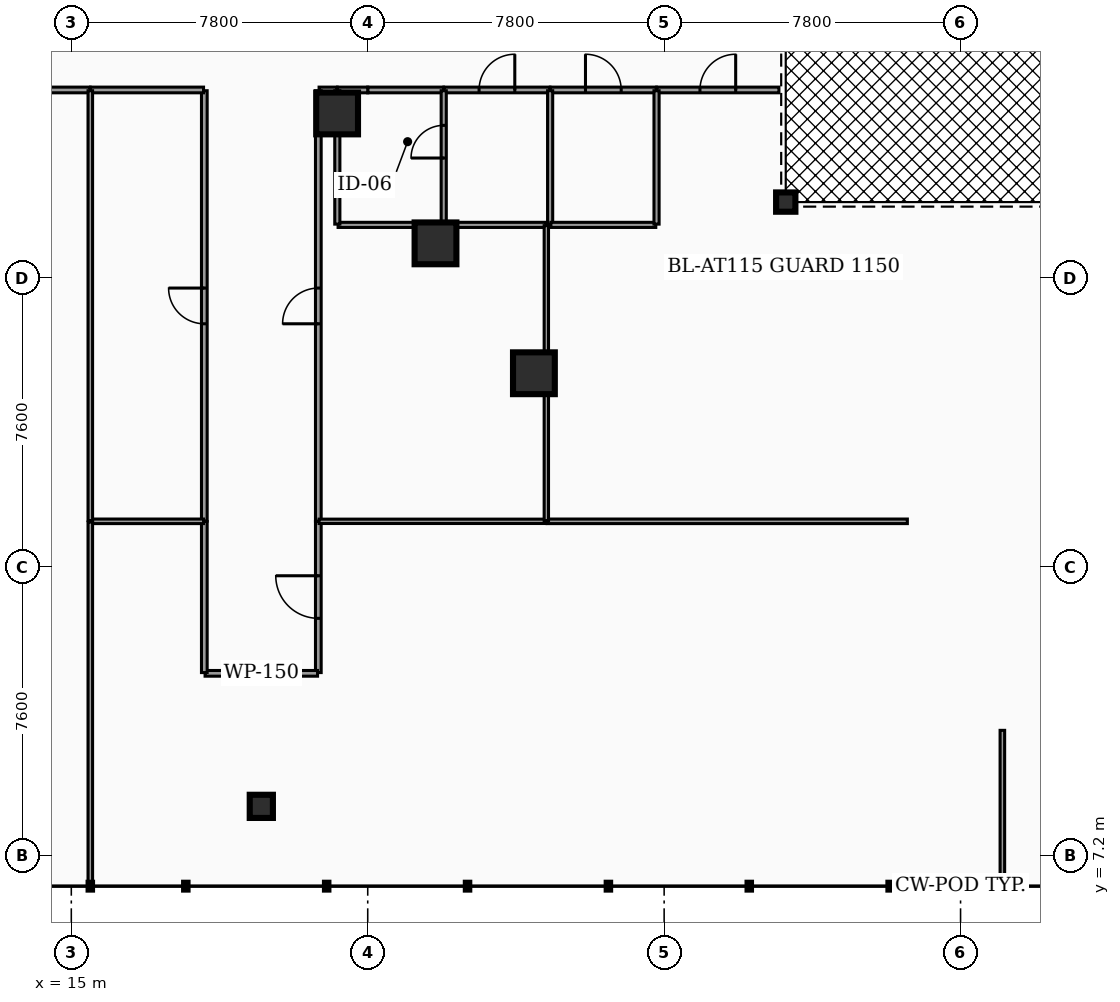
"""IFC4 building model, lengths in metres.
Left out: names, types, materials, properties, quantities, classifications, styles, units other than length and angle.
Written with IfcOpenShell. Run it as: python <this file> out.ifc"""

import sys

from ifc_helpers import new_model, si_unit, direction, frame, frame_2d, origin, origin_2d, place, context, subcontext, project, spatial, rectangle, hollow_rectangle, hollow_circle, extrude, element, fill, save


model = new_model("IFC4")
c1 = context("Model", 3, precision=1e-05, world=origin(), true_north=direction((0.0, 1.0)))
c2 = subcontext(c1, "Body", "Model", "MODEL_VIEW")
j1 = project(units=[si_unit("LENGTHUNIT", "METRE"), si_unit("PLANEANGLEUNIT", "RADIAN")], contexts=[c1])
p1 = place(None, origin())
s1 = spatial("IfcSite", under=j1, at=p1, CompositionType="ELEMENT")
p2 = place(p1, origin())
s2 = spatial("IfcBuilding", under=s1, at=p2, CompositionType="ELEMENT")
p3 = place(p2, frame((0.0, 0.0, 18.36)))
s3 = spatial("IfcBuildingStorey", under=s2, at=p3, CompositionType="ELEMENT", Elevation=18.36)
for number, where, z_axis, x_axis in (
    (1, (21.994, 26.732, 0.0), (0.0, 0.0, 1.0), (1.0, 0.0, 0.0)),
    (2, (24.583, 23.314, 0.0), (0.0, 0.0, 1.0), (1.0, 0.0, 0.0)),
    (3, (27.173, 19.896, 0.0), (0.0, 0.0, 1.0), (1.0, 0.0, 0.0)),
):
    element("IfcColumn", number, at=place(p3, frame(where, z_axis=z_axis, x_axis=x_axis)), inside=s3, PredefinedType="COLUMN", context=c2, shape_type="SweptSolid", body=[
        extrude(hollow_rectangle(XDim=1.1, YDim=1.1, WallThickness=0.055, at=origin_2d()), origin(), (0.0, 0.0, 1.0), 4.07),
    ])
p4 = place(p3, frame((33.8, 24.4, 0.0), z_axis=(0.0, 0.0, 1.0), x_axis=(1.0, 0.0, 0.0)))
e4 = element("IfcColumn", 4, at=p4, inside=s3, PredefinedType="COLUMN", context=c2, shape_type="SweptSolid", body=[
    extrude(hollow_circle(Radius=0.254, WallThickness=0.02, at=origin_2d()), origin(), (0.0, 0.0, 1.0), 4.07),
])
p5 = place(p3, frame((20.0, 8.5, 0.0), z_axis=(0.0, 0.0, 1.0), x_axis=(1.0, 0.0, 0.0)))
e5 = element("IfcColumn", 5, at=p5, inside=s3, PredefinedType="COLUMN", context=c2, shape_type="SweptSolid", body=[
    extrude(hollow_circle(Radius=0.305, WallThickness=0.025, at=origin_2d()), origin(), (0.0, 0.0, 1.0), 4.14),
])
p6 = place(p3, frame((22.8, 27.35, 0.0), z_axis=(0.0, 0.0, 1.0), x_axis=(1.0, 0.0, 0.0)))
e6 = element("IfcWall", 6, at=p6, inside=s3, PredefinedType="PARTITIONING", context=c2, shape_type="SweptSolid", body=[
    extrude(rectangle(XDim=1.995, YDim=0.15, at=frame_2d((0.998, 0.0))), origin(), (0.0, 0.0, 1.0), 3.027),
])
p7 = place(p3, frame((22.005, 27.35, 0.0), z_axis=(0.0, 0.0, 1.0), x_axis=(1.0, 0.0, 0.0)))
e7 = element("IfcWall", 7, at=p7, inside=s3, PredefinedType="PARTITIONING", context=c2, shape_type="SweptSolid", body=[
    extrude(rectangle(XDim=0.795, YDim=0.15, at=frame_2d((0.397, 0.0))), origin(), (0.0, 0.0, 1.0), 3.027),
])
p8 = place(p3, frame((24.805, 27.35, 0.0), z_axis=(0.0, 0.0, 1.0), x_axis=(1.0, 0.0, 0.0)))
e8 = element("IfcWall", 8, at=p8, inside=s3, PredefinedType="PARTITIONING", context=c2, shape_type="SweptSolid", body=[
    extrude(rectangle(XDim=2.79, YDim=0.15, at=frame_2d((1.395, 0.0))), origin(), (0.0, 0.0, 1.0), 3.027),
])
p9 = place(p8, frame((0.925, 0.0, 0.0)))
e9 = element("IfcOpeningElement", 9, at=p9, cuts=e8, PredefinedType="OPENING", context=c2, shape_type="SweptSolid", body=[
    extrude(rectangle(XDim=0.94, YDim=2.05, at=frame_2d((0.47, 1.025))), frame((0.0, 0.085, 0.0), z_axis=(0.0, -1.0, 0.0), x_axis=(1.0, 0.0, 0.0)), (0.0, 0.0, 1.0), 0.17),
])
p10 = place(p3, frame((27.605, 27.35, 0.0), z_axis=(0.0, 0.0, 1.0), x_axis=(1.0, 0.0, 0.0)))
e10 = element("IfcWall", 10, at=p10, inside=s3, PredefinedType="PARTITIONING", context=c2, shape_type="SweptSolid", body=[
    extrude(rectangle(XDim=2.79, YDim=0.15, at=frame_2d((1.395, 0.0))), origin(), (0.0, 0.0, 1.0), 3.027),
])
p11 = place(p10, frame((0.925, 0.0, 0.0)))
e11 = element("IfcOpeningElement", 11, at=p11, cuts=e10, PredefinedType="OPENING", context=c2, shape_type="SweptSolid", body=[
    extrude(rectangle(XDim=0.94, YDim=2.05, at=frame_2d((0.47, 1.025))), frame((0.0, 0.085, 0.0), z_axis=(0.0, -1.0, 0.0), x_axis=(1.0, 0.0, 0.0)), (0.0, 0.0, 1.0), 0.17),
])
p12 = place(p3, frame((21.5, 12.02, 0.0), z_axis=(0.0, 0.0, 1.0), x_axis=(0.0, 1.0, 0.0)))
e12 = element("IfcWall", 12, at=p12, inside=s3, PredefinedType="PARTITIONING", context=c2, shape_type="SweptSolid", body=[
    extrude(rectangle(XDim=3.975, YDim=0.15, at=frame_2d((1.988, 0.0))), origin(), (0.0, 0.0, 1.0), 3.027),
])
p13 = place(p12, frame((1.427, 0.0, 0.0)))
e13 = element("IfcOpeningElement", 13, at=p13, cuts=e12, PredefinedType="OPENING", context=c2, shape_type="SweptSolid", body=[
    extrude(rectangle(XDim=1.12, YDim=2.05, at=frame_2d((0.56, 1.025))), frame((0.0, 0.085, 0.0), z_axis=(0.0, -1.0, 0.0), x_axis=(1.0, 0.0, 0.0)), (0.0, 0.0, 1.0), 0.17),
])
p14 = place(p3, frame((18.52, 12.0, 0.0), z_axis=(0.0, 0.0, 1.0), x_axis=(1.0, 0.0, 0.0)))
e14 = element("IfcWall", 14, at=p14, inside=s3, PredefinedType="PARTITIONING", context=c2, shape_type="SweptSolid", body=[
    extrude(rectangle(XDim=2.96, YDim=0.15, at=frame_2d((1.48, 0.0))), origin(), (0.0, 0.0, 1.0), 3.027),
])
p15 = place(p3, frame((18.5, 12.02, 0.0), z_axis=(0.0, 0.0, 1.0), x_axis=(0.0, 1.0, 0.0)))
e15 = element("IfcWall", 15, at=p15, inside=s3, PredefinedType="PARTITIONING", context=c2, shape_type="SweptSolid", body=[
    extrude(rectangle(XDim=3.975, YDim=0.15, at=frame_2d((1.988, 0.0))), origin(), (0.0, 0.0, 1.0), 3.027),
])
p16 = place(p3, frame((21.52, 27.35, 0.0), z_axis=(0.0, 0.0, 1.0), x_axis=(1.0, 0.0, 0.0)))
e16 = element("IfcWall", 16, at=p16, inside=s3, PredefinedType="PARTITIONING", context=c2, shape_type="SweptSolid", body=[
    extrude(rectangle(XDim=0.475, YDim=0.15, at=frame_2d((0.238, 0.0))), origin(), (0.0, 0.0, 1.0), 3.027),
])
p17 = place(p3, frame((21.5, 16.005, 0.0), z_axis=(0.0, 0.0, 1.0), x_axis=(0.0, 1.0, 0.0)))
e17 = element("IfcWall", 17, at=p17, inside=s3, PredefinedType="PARTITIONING", context=c2, shape_type="SweptSolid", body=[
    extrude(rectangle(XDim=11.325, YDim=0.15, at=frame_2d((5.663, 0.0))), origin(), (0.0, 0.0, 1.0), 3.027),
])
p18 = place(p17, frame((5.192, 0.0, 0.0)))
e18 = element("IfcOpeningElement", 18, at=p18, cuts=e17, PredefinedType="OPENING", context=c2, shape_type="SweptSolid", body=[
    extrude(rectangle(XDim=0.94, YDim=2.05, at=frame_2d((0.47, 1.025))), frame((0.0, 0.085, 0.0), z_axis=(0.0, -1.0, 0.0), x_axis=(1.0, 0.0, 0.0)), (0.0, 0.0, 1.0), 0.17),
])
p19 = place(p3, frame((30.405, 27.35, 0.0), z_axis=(0.0, 0.0, 1.0), x_axis=(1.0, 0.0, 0.0)))
e19 = element("IfcWall", 19, at=p19, inside=s3, PredefinedType="PARTITIONING", context=c2, shape_type="SweptSolid", body=[
    extrude(rectangle(XDim=3.215, YDim=0.15, at=frame_2d((1.607, 0.0))), origin(), (0.0, 0.0, 1.0), 3.027),
])
p20 = place(p19, frame((1.137, 0.0, 0.0)))
e20 = element("IfcOpeningElement", 20, at=p20, cuts=e19, PredefinedType="OPENING", context=c2, shape_type="SweptSolid", body=[
    extrude(rectangle(XDim=0.94, YDim=2.05, at=frame_2d((0.47, 1.025))), frame((0.0, 0.085, 0.0), z_axis=(0.0, -1.0, 0.0), x_axis=(1.0, 0.0, 0.0)), (0.0, 0.0, 1.0), 0.17),
])
p21 = place(p3, frame((18.5, 16.005, 0.0), z_axis=(0.0, 0.0, 1.0), x_axis=(0.0, 1.0, 0.0)))
e21 = element("IfcWall", 21, at=p21, inside=s3, PredefinedType="PARTITIONING", context=c2, shape_type="SweptSolid", body=[
    extrude(rectangle(XDim=11.325, YDim=0.15, at=frame_2d((5.663, 0.0))), origin(), (0.0, 0.0, 1.0), 3.027),
])
p22 = place(p21, frame((5.192, 0.0, 0.0)))
e22 = element("IfcOpeningElement", 22, at=p22, cuts=e21, PredefinedType="OPENING", context=c2, shape_type="SweptSolid", body=[
    extrude(rectangle(XDim=0.94, YDim=2.05, at=frame_2d((0.47, 1.025))), frame((0.0, 0.085, 0.0), z_axis=(0.0, -1.0, 0.0), x_axis=(1.0, 0.0, 0.0)), (0.0, 0.0, 1.0), 0.17),
])
p23 = place(p3, frame((15.505, 27.35, 0.0), z_axis=(0.0, 0.0, 1.0), x_axis=(1.0, 0.0, 0.0)))
e23 = element("IfcWall", 23, at=p23, inside=s3, PredefinedType="PARTITIONING", context=c2, shape_type="SweptSolid", body=[
    extrude(rectangle(XDim=2.975, YDim=0.15, at=frame_2d((1.488, 0.0))), origin(), (0.0, 0.0, 1.0), 3.027),
])
p24 = place(p3, frame((11.52, 27.35, 0.0), z_axis=(0.0, 0.0, 1.0), x_axis=(1.0, 0.0, 0.0)))
e24 = element("IfcWall", 24, at=p24, inside=s3, PredefinedType="PARTITIONING", context=c2, shape_type="SweptSolid", body=[
    extrude(rectangle(XDim=3.975, YDim=0.15, at=frame_2d((1.988, 0.0))), origin(), (0.0, 0.0, 1.0), 3.027),
])
p25 = place(p24, frame((1.518, 0.0, 0.0)))
e25 = element("IfcOpeningElement", 25, at=p25, cuts=e24, PredefinedType="OPENING", context=c2, shape_type="SweptSolid", body=[
    extrude(rectangle(XDim=0.94, YDim=2.05, at=frame_2d((0.47, 1.025))), frame((0.0, 0.085, 0.0), z_axis=(0.0, -1.0, 0.0), x_axis=(1.0, 0.0, 0.0)), (0.0, 0.0, 1.0), 0.17),
])
p26 = place(p3, frame((24.8, 23.848, 0.0), z_axis=(0.0, 0.0, 1.0), x_axis=(0.0, 1.0, 0.0)))
e26 = element("IfcWall", 26, at=p26, inside=s3, PredefinedType="PARTITIONING", context=c2, shape_type="SweptSolid", body=[
    extrude(rectangle(XDim=3.482, YDim=0.135, at=frame_2d((1.741, 0.0))), origin(), (0.0, 0.0, 1.0), 3.027),
])
p27 = place(p26, frame((1.711, 0.0, 0.0)))
e27 = element("IfcOpeningElement", 27, at=p27, cuts=e26, PredefinedType="OPENING", context=c2, shape_type="SweptSolid", body=[
    extrude(rectangle(XDim=0.86, YDim=2.05, at=frame_2d((0.43, 1.025))), frame((0.0, 0.077, 0.0), z_axis=(0.0, -1.0, 0.0), x_axis=(1.0, 0.0, 0.0)), (0.0, 0.0, 1.0), 0.155),
])
p28 = place(p3, frame((22.02, 23.8, 0.0), z_axis=(0.0, 0.0, 1.0), x_axis=(1.0, 0.0, 0.0)))
e28 = element("IfcWall", 28, at=p28, inside=s3, PredefinedType="PARTITIONING", context=c2, shape_type="SweptSolid", body=[
    extrude(rectangle(XDim=2.732, YDim=0.135, at=frame_2d((1.366, 0.0))), origin(), (0.0, 0.0, 1.0), 3.027),
])
for number, where, z_axis, x_axis in (
    (29, (22.0, 23.82, 0.0), (0.0, 0.0, 1.0), (0.0, 1.0, 0.0)),
    (30, (27.6, 23.82, 0.0), (0.0, 0.0, 1.0), (0.0, 1.0, 0.0)),
):
    element("IfcWall", number, at=place(p3, frame(where, z_axis=z_axis, x_axis=x_axis)), inside=s3, PredefinedType="PARTITIONING", context=c2, shape_type="SweptSolid", body=[
        extrude(rectangle(XDim=3.51, YDim=0.135, at=frame_2d((1.755, 0.0))), origin(), (0.0, 0.0, 1.0), 3.027),
    ])
p29 = place(p3, frame((24.848, 23.8, 0.0), z_axis=(0.0, 0.0, 1.0), x_axis=(1.0, 0.0, 0.0)))
e31 = element("IfcWall", 31, at=p29, inside=s3, PredefinedType="PARTITIONING", context=c2, shape_type="SweptSolid", body=[
    extrude(rectangle(XDim=2.647, YDim=0.135, at=frame_2d((1.324, 0.0))), origin(), (0.0, 0.0, 1.0), 3.027),
])
p30 = place(p3, frame((27.62, 23.8, 0.0), z_axis=(0.0, 0.0, 1.0), x_axis=(1.0, 0.0, 0.0)))
e32 = element("IfcWall", 32, at=p30, inside=s3, PredefinedType="PARTITIONING", context=c2, shape_type="SweptSolid", body=[
    extrude(rectangle(XDim=2.76, YDim=0.135, at=frame_2d((1.38, 0.0))), origin(), (0.0, 0.0, 1.0), 3.027),
])
p31 = place(p3, frame((30.4, 23.82, 0.0), z_axis=(0.0, 0.0, 1.0), x_axis=(0.0, 1.0, 0.0)))
e33 = element("IfcWall", 33, at=p31, inside=s3, PredefinedType="PARTITIONING", context=c2, shape_type="SweptSolid", body=[
    extrude(rectangle(XDim=3.51, YDim=0.135, at=frame_2d((1.755, 0.0))), origin(), (0.0, 0.0, 1.0), 3.027),
])
p32 = place(p3, frame((21.52, 16.0, 0.0), z_axis=(0.0, 0.0, 1.0), x_axis=(1.0, 0.0, 0.0)))
e34 = element("IfcWall", 34, at=p32, inside=s3, PredefinedType="MOVABLE", context=c2, shape_type="SweptSolid", body=[
    extrude(rectangle(XDim=5.96, YDim=0.115, at=frame_2d((2.98, 0.0))), origin(), (0.0, 0.0, 1.0), 3.027),
])
p33 = place(p3, frame((27.52, 16.0, 0.0), z_axis=(0.0, 0.0, 1.0), x_axis=(1.0, 0.0, 0.0)))
e35 = element("IfcWall", 35, at=p33, inside=s3, PredefinedType="PARTITIONING", context=c2, shape_type="SweptSolid", body=[
    extrude(rectangle(XDim=9.48, YDim=0.12, at=frame_2d((4.74, 0.0))), origin(), (0.0, 0.0, 1.0), 3.027),
])
p34 = place(p3, frame((39.5, 6.415, 0.0), z_axis=(0.0, 0.0, 1.0), x_axis=(0.0, 1.0, 0.0)))
e36 = element("IfcWall", 36, at=p34, inside=s3, PredefinedType="PARTITIONING", context=c2, shape_type="SweptSolid", body=[
    extrude(rectangle(XDim=4.085, YDim=0.12, at=frame_2d((2.042, 0.0))), origin(), (0.0, 0.0, 1.0), 3.027),
])
p35 = place(p3, frame((15.52, 16.0, 0.0), z_axis=(0.0, 0.0, 1.0), x_axis=(1.0, 0.0, 0.0)))
e37 = element("IfcWall", 37, at=p35, inside=s3, PredefinedType="PARTITIONING", context=c2, shape_type="SweptSolid", body=[
    extrude(rectangle(XDim=2.96, YDim=0.12, at=frame_2d((1.48, 0.0))), origin(), (0.0, 0.0, 1.0), 3.027),
])
p36 = place(p3, frame((15.5, 6.415, 0.0), z_axis=(0.0, 0.0, 1.0), x_axis=(0.0, 1.0, 0.0)))
e38 = element("IfcWall", 38, at=p36, inside=s3, PredefinedType="PARTITIONING", context=c2, shape_type="SweptSolid", body=[
    extrude(rectangle(XDim=9.565, YDim=0.12, at=frame_2d((4.782, 0.0))), origin(), (0.0, 0.0, 1.0), 3.027),
])
p37 = place(p3, frame((27.5, 16.02, 0.0), z_axis=(0.0, 0.0, 1.0), x_axis=(0.0, 1.0, 0.0)))
e39 = element("IfcWall", 39, at=p37, inside=s3, PredefinedType="MOVABLE", context=c2, shape_type="SweptSolid", body=[
    extrude(rectangle(XDim=7.76, YDim=0.115, at=frame_2d((3.88, 0.0))), origin(), (0.0, 0.0, 1.0), 3.027),
])
p38 = place(p3, frame((15.5, 16.02, 0.0), z_axis=(0.0, 0.0, 1.0), x_axis=(0.0, 1.0, 0.0)))
e40 = element("IfcWall", 40, at=p38, inside=s3, PredefinedType="PARTITIONING", context=c2, shape_type="SweptSolid", body=[
    extrude(rectangle(XDim=11.31, YDim=0.12, at=frame_2d((5.655, 0.0))), origin(), (0.0, 0.0, 1.0), 3.027),
])
p39 = place(p9, origin())
e41 = element("IfcDoor", 41, at=p39, inside=s3, OperationType="SINGLE_SWING_RIGHT", PredefinedType="DOOR", context=c2, shape_type="SweptSolid", body=[
    extrude(rectangle(XDim=0.94, YDim=2.05, at=frame_2d((0.47, 1.025))), frame((0.0, 0.025, 0.0), z_axis=(0.0, -1.0, 0.0), x_axis=(1.0, 0.0, 0.0)), (0.0, 0.0, 1.0), 0.05),
])
fill(e9, e41)
p40 = place(p11, origin())
e42 = element("IfcDoor", 42, at=p40, inside=s3, OperationType="SINGLE_SWING_LEFT", PredefinedType="DOOR", context=c2, shape_type="SweptSolid", body=[
    extrude(rectangle(XDim=0.94, YDim=2.05, at=frame_2d((0.47, 1.025))), frame((0.0, 0.025, 0.0), z_axis=(0.0, -1.0, 0.0), x_axis=(1.0, 0.0, 0.0)), (0.0, 0.0, 1.0), 0.05),
])
fill(e11, e42)
p41 = place(p13, origin())
e43 = element("IfcDoor", 43, at=p41, inside=s3, OperationType="SINGLE_SWING_RIGHT", PredefinedType="DOOR", context=c2, shape_type="SweptSolid", body=[
    extrude(rectangle(XDim=1.12, YDim=2.05, at=frame_2d((0.56, 1.025))), frame((0.0, 0.025, 0.0), z_axis=(0.0, -1.0, 0.0), x_axis=(1.0, 0.0, 0.0)), (0.0, 0.0, 1.0), 0.05),
])
fill(e13, e43)
p42 = place(p18, origin())
e44 = element("IfcDoor", 44, at=p42, inside=s3, OperationType="SINGLE_SWING_LEFT", PredefinedType="DOOR", context=c2, shape_type="SweptSolid", body=[
    extrude(rectangle(XDim=0.94, YDim=2.05, at=frame_2d((0.47, 1.025))), frame((0.0, 0.025, 0.0), z_axis=(0.0, -1.0, 0.0), x_axis=(1.0, 0.0, 0.0)), (0.0, 0.0, 1.0), 0.05),
])
fill(e18, e44)
p43 = place(p20, origin())
e45 = element("IfcDoor", 45, at=p43, inside=s3, OperationType="SINGLE_SWING_RIGHT", PredefinedType="DOOR", context=c2, shape_type="SweptSolid", body=[
    extrude(rectangle(XDim=0.94, YDim=2.05, at=frame_2d((0.47, 1.025))), frame((0.0, 0.025, 0.0), z_axis=(0.0, -1.0, 0.0), x_axis=(1.0, 0.0, 0.0)), (0.0, 0.0, 1.0), 0.05),
])
fill(e20, e45)
p44 = place(p22, origin())
e46 = element("IfcDoor", 46, at=p44, inside=s3, OperationType="SINGLE_SWING_RIGHT", PredefinedType="DOOR", context=c2, shape_type="SweptSolid", body=[
    extrude(rectangle(XDim=0.94, YDim=2.05, at=frame_2d((0.47, 1.025))), frame((0.0, 0.025, 0.0), z_axis=(0.0, -1.0, 0.0), x_axis=(1.0, 0.0, 0.0)), (0.0, 0.0, 1.0), 0.05),
])
fill(e22, e46)
p45 = place(p27, origin())
e47 = element("IfcDoor", 47, at=p45, inside=s3, OperationType="SINGLE_SWING_LEFT", PredefinedType="DOOR", context=c2, shape_type="SweptSolid", body=[
    extrude(rectangle(XDim=0.86, YDim=2.05, at=frame_2d((0.43, 1.025))), frame((0.0, 0.025, 0.0), z_axis=(0.0, -1.0, 0.0), x_axis=(1.0, 0.0, 0.0)), (0.0, 0.0, 1.0), 0.05),
])
fill(e27, e47)
save(model, sys.argv[1])
